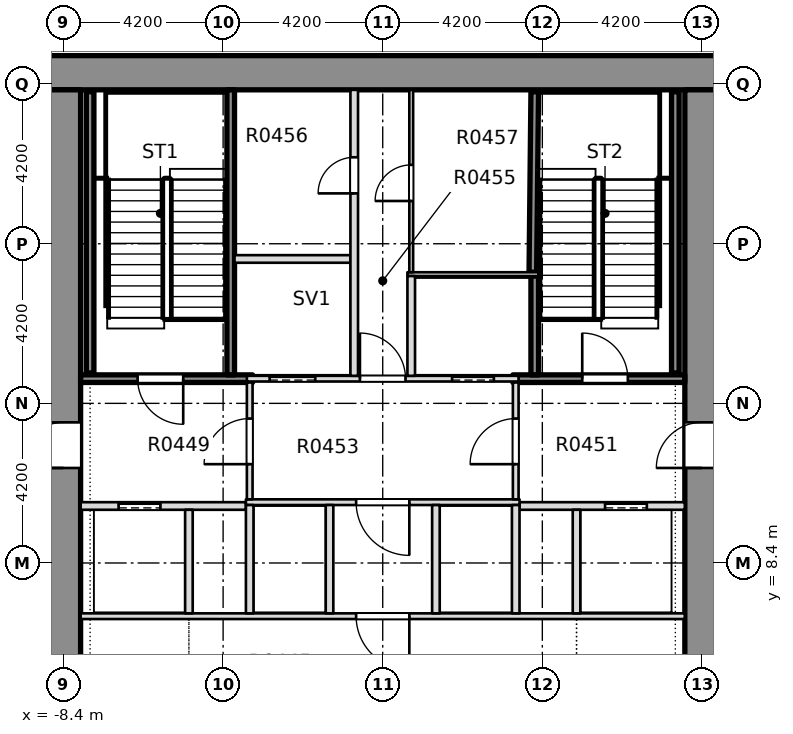
"""IFC4 building model, lengths in metres.
Left out: names, types, materials, properties, quantities, classifications, styles, units other than length and angle.
Written with IfcOpenShell. Run it as: python <this file> out.ifc"""

import sys

from ifc_helpers import new_model, si_unit, direction, frame, frame_2d, origin, place, context, subcontext, project, spatial, rectangle, extrude, element, fill, save


model = new_model("IFC4")
c1 = context("Model", 3, precision=1e-05, world=origin(), true_north=direction((0.0, 1.0)))
c2 = subcontext(c1, "Body", "Model", "MODEL_VIEW")
j1 = project(units=[si_unit("LENGTHUNIT", "METRE"), si_unit("PLANEANGLEUNIT", "RADIAN")], contexts=[c1])
p1 = place(None, origin())
s1 = spatial("IfcSite", under=j1, at=p1, CompositionType="ELEMENT")
p2 = place(p1, origin())
s2 = spatial("IfcBuilding", under=s1, at=p2, CompositionType="ELEMENT")
p3 = place(p2, frame((0.0, 0.0, 25.0)))
s3 = spatial("IfcBuildingStorey", under=s2, at=p3, CompositionType="ELEMENT", Elevation=25.0)
p4 = place(p3, frame((-11.7, 21.3, -0.4), z_axis=(0.0, 0.0, 1.0), x_axis=(1.0, 0.0, 0.0)))
e1 = element("IfcWall", 1, at=p4, inside=s3, PredefinedType="SOLIDWALL", context=c2, shape_type="SweptSolid", body=[
    extrude(rectangle(XDim=23.4, YDim=0.9, at=frame_2d((11.7, 0.0))), origin(), (0.0, 0.0, 1.0), 5.0),
])
p5 = place(p3, frame((-8.4, -7.5, -0.4), z_axis=(0.0, 0.0, 1.0), x_axis=(0.0, 1.0, 0.0)))
e2 = element("IfcWall", 2, at=p5, inside=s3, PredefinedType="SHEAR", context=c2, shape_type="SweptSolid", body=[
    extrude(rectangle(XDim=28.35, YDim=0.9, at=frame_2d((14.175, 0.0))), origin(), (0.0, 0.0, 1.0), 5.0),
])
p6 = place(p5, frame((18.4, 0.0, 0.4)))
e3 = element("IfcOpeningElement", 3, at=p6, cuts=e2, PredefinedType="OPENING", context=c2, shape_type="SweptSolid", body=[
    extrude(rectangle(XDim=1.2, YDim=2.1, at=frame_2d((0.6, 1.05))), frame((0.0, 0.46, 0.0), z_axis=(0.0, -1.0, 0.0), x_axis=(1.0, 0.0, 0.0)), (0.0, 0.0, 1.0), 0.92),
])
p7 = place(p3, frame((8.4, -7.5, -0.4), z_axis=(0.0, 0.0, 1.0), x_axis=(0.0, 1.0, 0.0)))
e4 = element("IfcWall", 4, at=p7, inside=s3, PredefinedType="SHEAR", context=c2, shape_type="SweptSolid", body=[
    extrude(rectangle(XDim=28.35, YDim=0.9, at=frame_2d((14.175, 0.0))), origin(), (0.0, 0.0, 1.0), 5.0),
])
p8 = place(p7, frame((18.4, 0.0, 0.4)))
e5 = element("IfcOpeningElement", 5, at=p8, cuts=e4, PredefinedType="OPENING", context=c2, shape_type="SweptSolid", body=[
    extrude(rectangle(XDim=1.2, YDim=2.1, at=frame_2d((0.6, 1.05))), frame((0.0, 0.46, 0.0), z_axis=(0.0, -1.0, 0.0), x_axis=(1.0, 0.0, 0.0)), (0.0, 0.0, 1.0), 0.92),
])
p9 = place(p3, frame((-7.949, 7.0, 0.0), z_axis=(0.0, 0.0, 1.0), x_axis=(1.0, 0.0, 0.0)))
e6 = element("IfcWall", 6, at=p9, inside=s3, PredefinedType="PARTITIONING", context=c2, shape_type="SweptSolid", body=[
    extrude(rectangle(XDim=15.898, YDim=0.15, at=frame_2d((7.949, 0.0))), origin(), (0.0, 0.0, 1.0), 4.6),
])
p10 = place(p9, frame((7.249, 0.0, 0.0)))
e7 = element("IfcOpeningElement", 7, at=p10, cuts=e6, PredefinedType="OPENING", context=c2, shape_type="SweptSolid", body=[
    extrude(rectangle(XDim=1.4, YDim=2.1, at=frame_2d((0.7, 1.05))), frame((0.0, 0.085, 0.0), z_axis=(0.0, -1.0, 0.0), x_axis=(1.0, 0.0, 0.0)), (0.0, 0.0, 1.0), 0.17),
])
p11 = place(p3, frame((-7.949, 9.9, 0.0), z_axis=(0.0, 0.0, 1.0), x_axis=(1.0, 0.0, 0.0)))
e8 = element("IfcWall", 8, at=p11, inside=s3, PredefinedType="PARTITIONING", context=c2, shape_type="SweptSolid", body=[
    extrude(rectangle(XDim=4.349, YDim=0.2, at=frame_2d((2.174, 0.0))), origin(), (0.0, 0.0, 1.0), 4.6),
])
p12 = place(p11, frame((0.999, 0.0, 0.0)))
e9 = element("IfcOpeningElement", 9, at=p12, cuts=e8, PredefinedType="OPENING", context=c2, shape_type="SweptSolid", body=[
    extrude(rectangle(XDim=1.1, YDim=2.1, at=frame_2d((0.55, 1.05))), frame((0.0, 0.11, 0.0), z_axis=(0.0, -1.0, 0.0), x_axis=(1.0, 0.0, 0.0)), (0.0, 0.0, 1.0), 0.22),
])
p13 = place(p3, frame((3.6, 9.9, 0.0), z_axis=(0.0, 0.0, 1.0), x_axis=(1.0, 0.0, 0.0)))
e10 = element("IfcWall", 10, at=p13, inside=s3, PredefinedType="PARTITIONING", context=c2, shape_type="SweptSolid", body=[
    extrude(rectangle(XDim=4.349, YDim=0.2, at=frame_2d((2.174, 0.0))), origin(), (0.0, 0.0, 1.0), 4.6),
])
p14 = place(p13, frame((2.25, 0.0, 0.0)))
e11 = element("IfcOpeningElement", 11, at=p14, cuts=e10, PredefinedType="OPENING", context=c2, shape_type="SweptSolid", body=[
    extrude(rectangle(XDim=1.1, YDim=2.1, at=frame_2d((0.55, 1.05))), frame((0.0, 0.11, 0.0), z_axis=(0.0, -1.0, 0.0), x_axis=(1.0, 0.0, 0.0)), (0.0, 0.0, 1.0), 0.22),
])
p15 = place(p3, frame((-3.6, 10.0, 0.0), z_axis=(0.0, 0.0, 1.0), x_axis=(1.0, 0.0, 0.0)))
e12 = element("IfcWall", 12, at=p15, inside=s3, PredefinedType="PARTITIONING", context=c2, shape_type="SweptSolid", body=[
    extrude(rectangle(XDim=7.2, YDim=0.15, at=frame_2d((3.6, 0.0))), origin(), (0.0, 0.0, 1.0), 4.6),
])
p16 = place(p15, frame((2.9, 0.0, 0.0)))
e13 = element("IfcOpeningElement", 13, at=p16, cuts=e12, PredefinedType="OPENING", context=c2, shape_type="SweptSolid", body=[
    extrude(rectangle(XDim=1.4, YDim=2.1, at=frame_2d((0.7, 1.05))), frame((0.0, 0.085, 0.0), z_axis=(0.0, -1.0, 0.0), x_axis=(1.0, 0.0, 0.0)), (0.0, 0.0, 1.0), 0.17),
])
p17 = place(p3, frame((-7.949, 13.25, 0.0), z_axis=(0.0, 0.0, 1.0), x_axis=(1.0, 0.0, 0.0)))
e14 = element("IfcWall", 14, at=p17, inside=s3, PredefinedType="SOLIDWALL", context=c2, shape_type="SweptSolid", body=[
    extrude(rectangle(XDim=4.524, YDim=0.2, at=frame_2d((2.262, 0.0))), origin(), (0.0, 0.0, 1.0), 4.6),
])
p18 = place(p17, frame((1.499, 0.0, 0.0)))
e15 = element("IfcOpeningElement", 15, at=p18, cuts=e14, PredefinedType="OPENING", context=c2, shape_type="SweptSolid", body=[
    extrude(rectangle(XDim=1.2, YDim=2.1, at=frame_2d((0.6, 1.05))), frame((0.0, 0.11, 0.0), z_axis=(0.0, -1.0, 0.0), x_axis=(1.0, 0.0, 0.0)), (0.0, 0.0, 1.0), 0.22),
])
p19 = place(p3, frame((-3.575, 13.25, 0.0), z_axis=(0.0, 0.0, 1.0), x_axis=(1.0, 0.0, 0.0)))
e16 = element("IfcWall", 16, at=p19, inside=s3, PredefinedType="PARTITIONING", context=c2, shape_type="SweptSolid", body=[
    extrude(rectangle(XDim=7.15, YDim=0.15, at=frame_2d((3.575, 0.0))), origin(), (0.0, 0.0, 1.0), 4.6),
])
p20 = place(p19, frame((0.6, 0.0, 0.0)))
e17 = element("IfcOpeningElement", 17, at=p20, cuts=e16, PredefinedType="OPENING", context=c2, shape_type="SweptSolid", body=[
    extrude(rectangle(XDim=1.2, YDim=2.1, at=frame_2d((0.6, 1.05))), frame((0.0, 0.085, 0.0), z_axis=(0.0, -1.0, 0.0), x_axis=(1.0, 0.0, 0.0)), (0.0, 0.0, 1.0), 0.17),
])
p21 = place(p19, frame((5.4, 0.0, 0.0)))
e18 = element("IfcOpeningElement", 18, at=p21, cuts=e16, PredefinedType="OPENING", context=c2, shape_type="SweptSolid", body=[
    extrude(rectangle(XDim=1.1, YDim=2.1, at=frame_2d((0.55, 1.05))), frame((0.0, 0.085, 0.0), z_axis=(0.0, -1.0, 0.0), x_axis=(1.0, 0.0, 0.0)), (0.0, 0.0, 1.0), 0.17),
])
p22 = place(p19, frame((2.975, 0.0, 0.0)))
e19 = element("IfcOpeningElement", 19, at=p22, cuts=e16, PredefinedType="OPENING", context=c2, shape_type="SweptSolid", body=[
    extrude(rectangle(XDim=1.2, YDim=2.1, at=frame_2d((0.6, 1.05))), frame((0.0, 0.085, 0.0), z_axis=(0.0, -1.0, 0.0), x_axis=(1.0, 0.0, 0.0)), (0.0, 0.0, 1.0), 0.17),
])
p23 = place(p3, frame((3.425, 13.25, 0.0), z_axis=(0.0, 0.0, 1.0), x_axis=(1.0, 0.0, 0.0)))
e20 = element("IfcWall", 20, at=p23, inside=s3, PredefinedType="SOLIDWALL", context=c2, shape_type="SweptSolid", body=[
    extrude(rectangle(XDim=4.524, YDim=0.2, at=frame_2d((2.262, 0.0))), origin(), (0.0, 0.0, 1.0), 4.6),
])
p24 = place(p23, frame((1.825, 0.0, 0.0)))
e21 = element("IfcOpeningElement", 21, at=p24, cuts=e20, PredefinedType="OPENING", context=c2, shape_type="SweptSolid", body=[
    extrude(rectangle(XDim=1.2, YDim=2.1, at=frame_2d((0.6, 1.05))), frame((0.0, 0.11, 0.0), z_axis=(0.0, -1.0, 0.0), x_axis=(1.0, 0.0, 0.0)), (0.0, 0.0, 1.0), 0.22),
])
p25 = place(p3, frame((0.65, 16.0, 0.0), z_axis=(0.0, 0.0, 1.0), x_axis=(1.0, 0.0, 0.0)))
e22 = element("IfcWall", 22, at=p25, inside=s3, PredefinedType="PARTITIONING", context=c2, shape_type="SweptSolid", body=[
    extrude(rectangle(XDim=3.45, YDim=0.1, at=frame_2d((1.725, 0.0))), origin(), (0.0, 0.0, 1.0), 4.6),
])
p26 = place(p3, frame((-3.9, 16.4, 0.0), z_axis=(0.0, 0.0, 1.0), x_axis=(1.0, 0.0, 0.0)))
e23 = element("IfcWall", 23, at=p26, inside=s3, PredefinedType="PARTITIONING", context=c2, shape_type="SweptSolid", body=[
    extrude(rectangle(XDim=3.05, YDim=0.2, at=frame_2d((1.525, 0.0))), origin(), (0.0, 0.0, 1.0), 4.6),
])
p27 = place(p3, frame((-5.1, 7.075, 0.0), z_axis=(0.0, 0.0, 1.0), x_axis=(0.0, 1.0, 0.0)))
e24 = element("IfcWall", 24, at=p27, inside=s3, PredefinedType="PARTITIONING", context=c2, shape_type="SweptSolid", body=[
    extrude(rectangle(XDim=2.725, YDim=0.2, at=frame_2d((1.363, 0.0))), origin(), (0.0, 0.0, 1.0), 4.6),
])
p28 = place(p3, frame((-4.0, 13.35, 0.0), z_axis=(0.0, 0.0, 1.0), x_axis=(0.0, 1.0, 0.0)))
e25 = element("IfcWall", 25, at=p28, inside=s3, PredefinedType="SOLIDWALL", context=c2, shape_type="SweptSolid", body=[
    extrude(rectangle(XDim=7.499, YDim=0.2, at=frame_2d((3.75, 0.0))), origin(), (0.0, 0.0, 1.0), 4.6),
])
p29 = place(p3, frame((-3.5, 7.075, 0.0), z_axis=(0.0, 0.0, 1.0), x_axis=(0.0, 1.0, 0.0)))
e26 = element("IfcWall", 26, at=p29, inside=s3, PredefinedType="PARTITIONING", context=c2, shape_type="SweptSolid", body=[
    extrude(rectangle(XDim=2.85, YDim=0.2, at=frame_2d((1.425, 0.0))), origin(), (0.0, 0.0, 1.0), 4.6),
])
p30 = place(p3, frame((-3.5, 10.075, 0.0), z_axis=(0.0, 0.0, 1.0), x_axis=(0.0, 1.0, 0.0)))
e27 = element("IfcWall", 27, at=p30, inside=s3, PredefinedType="PARTITIONING", context=c2, shape_type="SweptSolid", body=[
    extrude(rectangle(XDim=3.075, YDim=0.15, at=frame_2d((1.538, 0.0))), origin(), (0.0, 0.0, 1.0), 4.6),
])
p31 = place(p30, frame((0.925, 0.0, 0.0)))
e28 = element("IfcOpeningElement", 28, at=p31, cuts=e27, PredefinedType="OPENING", context=c2, shape_type="SweptSolid", body=[
    extrude(rectangle(XDim=1.2, YDim=2.1, at=frame_2d((0.6, 1.05))), frame((0.0, 0.085, 0.0), z_axis=(0.0, -1.0, 0.0), x_axis=(1.0, 0.0, 0.0)), (0.0, 0.0, 1.0), 0.17),
])
p32 = place(p3, frame((-1.4, 7.075, 0.0), z_axis=(0.0, 0.0, 1.0), x_axis=(0.0, 1.0, 0.0)))
e29 = element("IfcWall", 29, at=p32, inside=s3, PredefinedType="PARTITIONING", context=c2, shape_type="SweptSolid", body=[
    extrude(rectangle(XDim=2.85, YDim=0.2, at=frame_2d((1.425, 0.0))), origin(), (0.0, 0.0, 1.0), 4.6),
])
p33 = place(p3, frame((-0.75, 13.325, 0.0), z_axis=(0.0, 0.0, 1.0), x_axis=(0.0, 1.0, 0.0)))
e30 = element("IfcWall", 30, at=p33, inside=s3, PredefinedType="PARTITIONING", context=c2, shape_type="SweptSolid", body=[
    extrude(rectangle(XDim=7.524, YDim=0.2, at=frame_2d((3.762, 0.0))), origin(), (0.0, 0.0, 1.0), 4.6),
])
p34 = place(p33, frame((4.8, 0.0, 0.0)))
e31 = element("IfcOpeningElement", 31, at=p34, cuts=e30, PredefinedType="OPENING", context=c2, shape_type="SweptSolid", body=[
    extrude(rectangle(XDim=0.95, YDim=2.1, at=frame_2d((0.475, 1.05))), frame((0.0, 0.11, 0.0), z_axis=(0.0, -1.0, 0.0), x_axis=(1.0, 0.0, 0.0)), (0.0, 0.0, 1.0), 0.22),
])
p35 = place(p3, frame((0.75, 13.325, 0.0), z_axis=(0.0, 0.0, 1.0), x_axis=(0.0, 1.0, 0.0)))
e32 = element("IfcWall", 32, at=p35, inside=s3, PredefinedType="PARTITIONING", context=c2, shape_type="SweptSolid", body=[
    extrude(rectangle(XDim=2.625, YDim=0.2, at=frame_2d((1.312, 0.0))), origin(), (0.0, 0.0, 1.0), 4.6),
])
p36 = place(p3, frame((0.75, 16.05, 0.0), z_axis=(0.0, 0.0, 1.0), x_axis=(0.0, 1.0, 0.0)))
e33 = element("IfcWall", 33, at=p36, inside=s3, PredefinedType="PARTITIONING", context=c2, shape_type="SweptSolid", body=[
    extrude(rectangle(XDim=4.799, YDim=0.1, at=frame_2d((2.399, 0.0))), origin(), (0.0, 0.0, 1.0), 4.6),
])
p37 = place(p36, frame((1.875, 0.0, 0.0)))
e34 = element("IfcOpeningElement", 34, at=p37, cuts=e33, PredefinedType="OPENING", context=c2, shape_type="SweptSolid", body=[
    extrude(rectangle(XDim=0.95, YDim=2.1, at=frame_2d((0.475, 1.05))), frame((0.0, 0.06, 0.0), z_axis=(0.0, -1.0, 0.0), x_axis=(1.0, 0.0, 0.0)), (0.0, 0.0, 1.0), 0.12),
])
for number, where, z_axis, x_axis in (
    (35, (1.4, 7.075, 0.0), (0.0, 0.0, 1.0), (0.0, 1.0, 0.0)),
    (36, (3.5, 7.075, 0.0), (0.0, 0.0, 1.0), (0.0, 1.0, 0.0)),
):
    element("IfcWall", number, at=place(p3, frame(where, z_axis=z_axis, x_axis=x_axis)), inside=s3, PredefinedType="PARTITIONING", context=c2, shape_type="SweptSolid", body=[
        extrude(rectangle(XDim=2.85, YDim=0.2, at=frame_2d((1.425, 0.0))), origin(), (0.0, 0.0, 1.0), 4.6),
    ])
p38 = place(p3, frame((3.5, 10.075, 0.0), z_axis=(0.0, 0.0, 1.0), x_axis=(0.0, 1.0, 0.0)))
e37 = element("IfcWall", 37, at=p38, inside=s3, PredefinedType="PARTITIONING", context=c2, shape_type="SweptSolid", body=[
    extrude(rectangle(XDim=3.075, YDim=0.15, at=frame_2d((1.538, 0.0))), origin(), (0.0, 0.0, 1.0), 4.6),
])
p39 = place(p38, frame((0.925, 0.0, 0.0)))
e38 = element("IfcOpeningElement", 38, at=p39, cuts=e37, PredefinedType="OPENING", context=c2, shape_type="SweptSolid", body=[
    extrude(rectangle(XDim=1.2, YDim=2.1, at=frame_2d((0.6, 1.05))), frame((0.0, 0.085, 0.0), z_axis=(0.0, -1.0, 0.0), x_axis=(1.0, 0.0, 0.0)), (0.0, 0.0, 1.0), 0.17),
])
p40 = place(p3, frame((4.0, 13.35, 0.0), z_axis=(0.0, 0.0, 1.0), x_axis=(0.0, 1.0, 0.0)))
e39 = element("IfcWall", 39, at=p40, inside=s3, PredefinedType="SOLIDWALL", context=c2, shape_type="SweptSolid", body=[
    extrude(rectangle(XDim=2.6, YDim=0.2, at=frame_2d((1.3, 0.0))), origin(), (0.0, 0.0, 1.0), 4.6),
])
p41 = place(p3, frame((3.95, 16.05, 0.0), z_axis=(0.0, 0.0, 1.0), x_axis=(0.010538176883, 0.999944471872, 0.0)))
e40 = element("IfcWall", 40, at=p41, inside=s3, PredefinedType="SOLIDWALL", context=c2, shape_type="SweptSolid", body=[
    extrude(rectangle(XDim=4.749, YDim=0.2, at=frame_2d((2.375, 0.0))), origin(), (0.0, 0.0, 1.0), 4.6),
])
p42 = place(p3, frame((5.1, 7.075, 0.0), z_axis=(0.0, 0.0, 1.0), x_axis=(0.0, 1.0, 0.0)))
e41 = element("IfcWall", 41, at=p42, inside=s3, PredefinedType="PARTITIONING", context=c2, shape_type="SweptSolid", body=[
    extrude(rectangle(XDim=2.725, YDim=0.2, at=frame_2d((1.363, 0.0))), origin(), (0.0, 0.0, 1.0), 4.6),
])
for number, where, z_axis, x_axis in (
    (42, (-7.7, 13.4, 0.0), (0.0, 0.0, 1.0), (0.0, 1.0, 0.0)),
    (43, (7.7, 13.4, 0.0), (0.0, 0.0, 1.0), (0.0, 1.0, 0.0)),
):
    element("IfcWall", number, at=place(p3, frame(where, z_axis=z_axis, x_axis=x_axis)), inside=s3, PredefinedType="SOLIDWALL", context=c2, shape_type="SweptSolid", body=[
        extrude(rectangle(XDim=7.4, YDim=0.2, at=frame_2d((3.7, 0.0))), origin(), (0.0, 0.0, 1.0), 4.6),
    ])
p43 = place(p18, origin())
e44 = element("IfcDoor", 44, at=p43, inside=s3, OperationType="SINGLE_SWING_LEFT", PredefinedType="DOOR", context=c2, shape_type="SweptSolid", body=[
    extrude(rectangle(XDim=1.2, YDim=2.1, at=frame_2d((0.6, 1.05))), frame((0.0, 0.025, 0.0), z_axis=(0.0, -1.0, 0.0), x_axis=(1.0, 0.0, 0.0)), (0.0, 0.0, 1.0), 0.05),
])
fill(e15, e44)
p44 = place(p12, origin())
e45 = element("IfcDoor", 45, at=p44, inside=s3, OperationType="SLIDING_TO_RIGHT", PredefinedType="DOOR", context=c2, shape_type="SweptSolid", body=[
    extrude(rectangle(XDim=1.1, YDim=2.1, at=frame_2d((0.55, 1.05))), frame((0.0, 0.025, 0.0), z_axis=(0.0, -1.0, 0.0), x_axis=(1.0, 0.0, 0.0)), (0.0, 0.0, 1.0), 0.05),
])
fill(e9, e45)
p45 = place(p24, origin())
e46 = element("IfcDoor", 46, at=p45, inside=s3, OperationType="SINGLE_SWING_RIGHT", PredefinedType="DOOR", context=c2, shape_type="SweptSolid", body=[
    extrude(rectangle(XDim=1.2, YDim=2.1, at=frame_2d((0.6, 1.05))), frame((0.0, 0.025, 0.0), z_axis=(0.0, -1.0, 0.0), x_axis=(1.0, 0.0, 0.0)), (0.0, 0.0, 1.0), 0.05),
])
fill(e21, e46)
p46 = place(p14, origin())
e47 = element("IfcDoor", 47, at=p46, inside=s3, OperationType="SLIDING_TO_LEFT", PredefinedType="DOOR", context=c2, shape_type="SweptSolid", body=[
    extrude(rectangle(XDim=1.1, YDim=2.1, at=frame_2d((0.55, 1.05))), frame((0.0, 0.025, 0.0), z_axis=(0.0, -1.0, 0.0), x_axis=(1.0, 0.0, 0.0)), (0.0, 0.0, 1.0), 0.05),
])
fill(e11, e47)
p47 = place(p10, origin())
e48 = element("IfcDoor", 48, at=p47, inside=s3, OperationType="SINGLE_SWING_RIGHT", PredefinedType="DOOR", context=c2, shape_type="SweptSolid", body=[
    extrude(rectangle(XDim=1.4, YDim=2.1, at=frame_2d((0.7, 1.05))), frame((0.0, 0.025, 0.0), z_axis=(0.0, -1.0, 0.0), x_axis=(1.0, 0.0, 0.0)), (0.0, 0.0, 1.0), 0.05),
])
fill(e7, e48)
p48 = place(p16, origin())
e49 = element("IfcDoor", 49, at=p48, inside=s3, OperationType="SINGLE_SWING_RIGHT", PredefinedType="DOOR", context=c2, shape_type="SweptSolid", body=[
    extrude(rectangle(XDim=1.4, YDim=2.1, at=frame_2d((0.7, 1.05))), frame((0.0, 0.025, 0.0), z_axis=(0.0, -1.0, 0.0), x_axis=(1.0, 0.0, 0.0)), (0.0, 0.0, 1.0), 0.05),
])
fill(e13, e49)
p49 = place(p20, origin())
e50 = element("IfcDoor", 50, at=p49, inside=s3, OperationType="SLIDING_TO_RIGHT", PredefinedType="DOOR", context=c2, shape_type="SweptSolid", body=[
    extrude(rectangle(XDim=1.2, YDim=2.1, at=frame_2d((0.6, 1.05))), frame((0.0, 0.025, 0.0), z_axis=(0.0, -1.0, 0.0), x_axis=(1.0, 0.0, 0.0)), (0.0, 0.0, 1.0), 0.05),
])
fill(e17, e50)
p50 = place(p21, origin())
e51 = element("IfcDoor", 51, at=p50, inside=s3, OperationType="SLIDING_TO_LEFT", PredefinedType="DOOR", context=c2, shape_type="SweptSolid", body=[
    extrude(rectangle(XDim=1.1, YDim=2.1, at=frame_2d((0.55, 1.05))), frame((0.0, 0.025, 0.0), z_axis=(0.0, -1.0, 0.0), x_axis=(1.0, 0.0, 0.0)), (0.0, 0.0, 1.0), 0.05),
])
fill(e18, e51)
p51 = place(p22, origin())
e52 = element("IfcDoor", 52, at=p51, inside=s3, OperationType="SINGLE_SWING_RIGHT", PredefinedType="DOOR", context=c2, shape_type="SweptSolid", body=[
    extrude(rectangle(XDim=1.2, YDim=2.1, at=frame_2d((0.6, 1.05))), frame((0.0, 0.025, 0.0), z_axis=(0.0, -1.0, 0.0), x_axis=(1.0, 0.0, 0.0)), (0.0, 0.0, 1.0), 0.05),
])
fill(e19, e52)
p52 = place(p34, origin())
e53 = element("IfcDoor", 53, at=p52, inside=s3, OperationType="SINGLE_SWING_RIGHT", PredefinedType="DOOR", context=c2, shape_type="SweptSolid", body=[
    extrude(rectangle(XDim=0.95, YDim=2.1, at=frame_2d((0.475, 1.05))), frame((0.0, 0.025, 0.0), z_axis=(0.0, -1.0, 0.0), x_axis=(1.0, 0.0, 0.0)), (0.0, 0.0, 1.0), 0.05),
])
fill(e31, e53)
p53 = place(p37, origin())
e54 = element("IfcDoor", 54, at=p53, inside=s3, OperationType="SINGLE_SWING_LEFT", PredefinedType="DOOR", context=c2, shape_type="SweptSolid", body=[
    extrude(rectangle(XDim=0.95, YDim=2.1, at=frame_2d((0.475, 1.05))), frame((0.0, 0.025, 0.0), z_axis=(0.0, -1.0, 0.0), x_axis=(1.0, 0.0, 0.0)), (0.0, 0.0, 1.0), 0.05),
])
fill(e34, e54)
p54 = place(p31, origin())
e55 = element("IfcDoor", 55, at=p54, inside=s3, OperationType="SINGLE_SWING_RIGHT", PredefinedType="DOOR", context=c2, shape_type="SweptSolid", body=[
    extrude(rectangle(XDim=1.2, YDim=2.1, at=frame_2d((0.6, 1.05))), frame((0.0, 0.025, 0.0), z_axis=(0.0, -1.0, 0.0), x_axis=(1.0, 0.0, 0.0)), (0.0, 0.0, 1.0), 0.05),
])
fill(e28, e55)
p55 = place(p39, origin())
e56 = element("IfcDoor", 56, at=p55, inside=s3, OperationType="SINGLE_SWING_LEFT", PredefinedType="DOOR", context=c2, shape_type="SweptSolid", body=[
    extrude(rectangle(XDim=1.2, YDim=2.1, at=frame_2d((0.6, 1.05))), frame((0.0, 0.025, 0.0), z_axis=(0.0, -1.0, 0.0), x_axis=(1.0, 0.0, 0.0)), (0.0, 0.0, 1.0), 0.05),
])
fill(e38, e56)
p56 = place(p6, origin())
e57 = element("IfcDoor", 57, at=p56, inside=s3, OperationType="SINGLE_SWING_LEFT", PredefinedType="DOOR", context=c2, shape_type="SweptSolid", body=[
    extrude(rectangle(XDim=1.2, YDim=2.1, at=frame_2d((0.6, 1.05))), frame((0.0, 0.025, 0.0), z_axis=(0.0, -1.0, 0.0), x_axis=(1.0, 0.0, 0.0)), (0.0, 0.0, 1.0), 0.05),
])
fill(e3, e57)
p57 = place(p8, origin())
e58 = element("IfcDoor", 58, at=p57, inside=s3, OperationType="SINGLE_SWING_LEFT", PredefinedType="DOOR", context=c2, shape_type="SweptSolid", body=[
    extrude(rectangle(XDim=1.2, YDim=2.1, at=frame_2d((0.6, 1.05))), frame((0.0, 0.025, 0.0), z_axis=(0.0, -1.0, 0.0), x_axis=(1.0, 0.0, 0.0)), (0.0, 0.0, 1.0), 0.05),
])
fill(e5, e58)
save(model, sys.argv[1])
